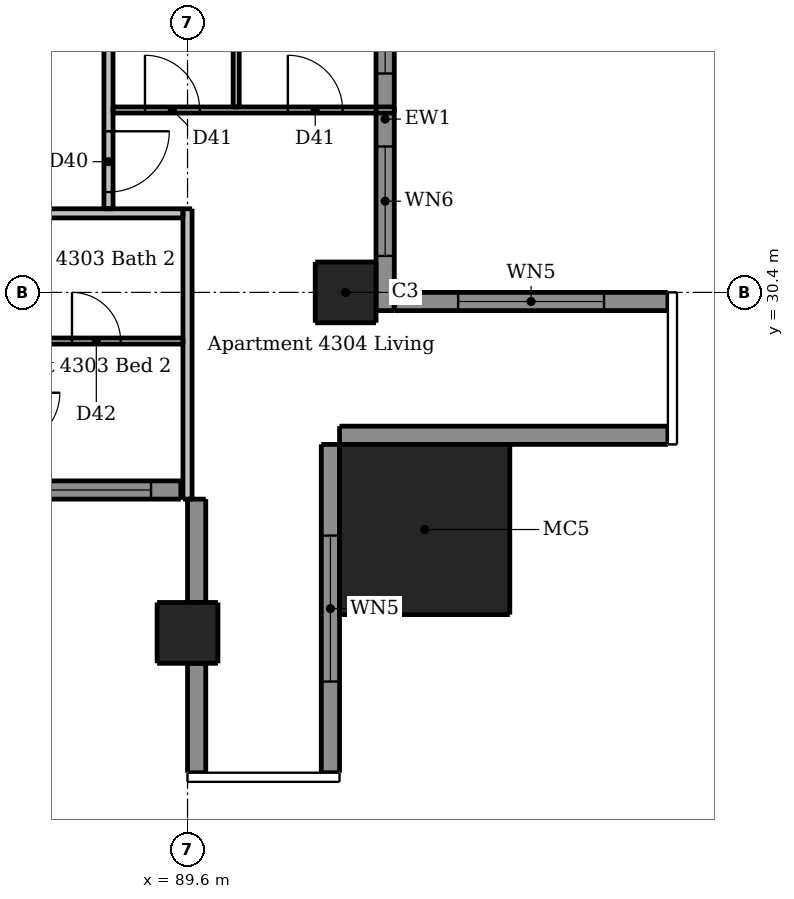
"""IFC4 building model, lengths in metres.
Left out: names, types, materials, properties, quantities, classifications, styles, units other than length and angle.
Written with IfcOpenShell. Run it as: python <this file> out.ifc"""

import sys

from ifc_helpers import new_model, si_unit, direction, frame, frame_2d, origin, origin_2d, place, context, subcontext, project, spatial, rectangle, extrude, element, fill, save


model = new_model("IFC4")
c1 = context("Model", 3, precision=1e-05, world=origin(), true_north=direction((0.0, 1.0)))
c2 = subcontext(c1, "Body", "Model", "MODEL_VIEW")
j1 = project(units=[si_unit("LENGTHUNIT", "METRE"), si_unit("PLANEANGLEUNIT", "RADIAN")], contexts=[c1])
p1 = place(None, origin())
s1 = spatial("IfcSite", under=j1, at=p1, CompositionType="ELEMENT")
p2 = place(p1, origin())
s2 = spatial("IfcBuilding", under=s1, at=p2, CompositionType="ELEMENT")
p3 = place(p2, frame((0.0, 0.0, 161.5)))
s3 = spatial("IfcBuildingStorey", under=s2, at=p3, CompositionType="ELEMENT", Elevation=161.5)
for number, where, z_axis, x_axis in (
    (1, (89.6, 24.8, 0.0), (0.0, 0.0, 1.0), (1.0, 0.0, 0.0)),
    (2, (92.2, 30.4, 0.0), (0.0, 0.0, 1.0), (1.0, 0.0, 0.0)),
):
    element("IfcColumn", number, at=place(p3, frame(where, z_axis=z_axis, x_axis=x_axis)), inside=s3, PredefinedType="COLUMN", context=c2, shape_type="SweptSolid", body=[
        extrude(rectangle(XDim=1.0, YDim=1.0, at=origin_2d()), origin(), (0.0, 0.0, 1.0), 3.05),
    ])
p4 = place(p3, frame((93.5, 26.5, 0.0), z_axis=(0.0, 0.0, 1.0), x_axis=(1.0, 0.0, 0.0)))
e3 = element("IfcColumn", 3, at=p4, inside=s3, PredefinedType="COLUMN", context=c2, shape_type="SweptSolid", body=[
    extrude(rectangle(XDim=2.8, YDim=2.8, at=origin_2d()), origin(), (0.0, 0.0, 1.0), 3.3),
])
p5 = place(p3, frame((89.75, 27.0, 0.0), z_axis=(0.0, 0.0, 1.0), x_axis=(0.0, -1.0, 0.0)))
e4 = element("IfcWall", 4, at=p5, inside=s3, PredefinedType="SOLIDWALL", context=c2, shape_type="SweptSolid", body=[
    extrude(rectangle(XDim=1.7, YDim=0.3, at=frame_2d((0.85, 0.0))), origin(), (0.0, 0.0, 1.0), 3.05),
])
p6 = place(p3, frame((89.75, 24.3, 0.0), z_axis=(0.0, 0.0, 1.0), x_axis=(0.0, -1.0, 0.0)))
e5 = element("IfcWall", 5, at=p6, inside=s3, PredefinedType="SOLIDWALL", context=c2, shape_type="SweptSolid", body=[
    extrude(rectangle(XDim=1.8, YDim=0.3, at=frame_2d((0.9, 0.0))), origin(), (0.0, 0.0, 1.0), 3.05),
])
p7 = place(p3, frame((91.95, 22.5, 0.0), z_axis=(0.0, 0.0, 1.0), x_axis=(0.0, 1.0, 0.0)))
e6 = element("IfcWall", 6, at=p7, inside=s3, PredefinedType="SOLIDWALL", context=c2, shape_type="SweptSolid", body=[
    extrude(rectangle(XDim=5.4, YDim=0.3, at=frame_2d((2.7, 0.0))), origin(), (0.0, 0.0, 1.0), 3.05),
])
p8 = place(p7, frame((1.5, 0.0, 0.15)))
e7 = element("IfcOpeningElement", 7, at=p8, cuts=e6, PredefinedType="OPENING", context=c2, shape_type="SweptSolid", body=[
    extrude(rectangle(XDim=2.4, YDim=2.1, at=frame_2d((1.2, 1.05))), frame((0.0, 0.16, 0.0), z_axis=(0.0, -1.0, 0.0), x_axis=(1.0, 0.0, 0.0)), (0.0, 0.0, 1.0), 0.32),
])
p9 = place(p3, frame((92.1, 28.05, 0.0), z_axis=(0.0, 0.0, 1.0), x_axis=(1.0, 0.0, 0.0)))
e8 = element("IfcWall", 8, at=p9, inside=s3, PredefinedType="SOLIDWALL", context=c2, shape_type="SweptSolid", body=[
    extrude(rectangle(XDim=5.4, YDim=0.3, at=frame_2d((2.7, 0.0))), origin(), (0.0, 0.0, 1.0), 3.05),
])
p10 = place(p3, frame((97.5, 30.25, 0.0), z_axis=(0.0, 0.0, 1.0), x_axis=(-1.0, 0.0, 0.0)))
e9 = element("IfcWall", 9, at=p10, inside=s3, PredefinedType="SOLIDWALL", context=c2, shape_type="SweptSolid", body=[
    extrude(rectangle(XDim=4.5, YDim=0.3, at=frame_2d((2.25, 0.0))), origin(), (0.0, 0.0, 1.0), 3.05),
])
p11 = place(p10, frame((1.05, 0.0, 0.15)))
e10 = element("IfcOpeningElement", 10, at=p11, cuts=e9, PredefinedType="OPENING", context=c2, shape_type="SweptSolid", body=[
    extrude(rectangle(XDim=2.4, YDim=2.1, at=frame_2d((1.2, 1.05))), frame((0.0, 0.16, 0.0), z_axis=(0.0, -1.0, 0.0), x_axis=(1.0, 0.0, 0.0)), (0.0, 0.0, 1.0), 0.32),
])
p12 = place(p3, frame((83.7, 27.15, 0.0), z_axis=(0.0, 0.0, 1.0), x_axis=(1.0, 0.0, 0.0)))
e11 = element("IfcWall", 11, at=p12, inside=s3, PredefinedType="SOLIDWALL", context=c2, shape_type="SweptSolid", body=[
    extrude(rectangle(XDim=5.79, YDim=0.3, at=frame_2d((2.895, 0.0))), origin(), (0.0, 0.0, 1.0), 3.05),
])
p13 = place(p12, frame((0.5, 0.0, 0.15)))
e12 = element("IfcOpeningElement", 12, at=p13, cuts=e11, PredefinedType="OPENING", context=c2, shape_type="SweptSolid", body=[
    extrude(rectangle(XDim=1.8, YDim=2.1, at=frame_2d((0.9, 1.05))), frame((0.0, 0.16, 0.0), z_axis=(0.0, -1.0, 0.0), x_axis=(1.0, 0.0, 0.0)), (0.0, 0.0, 1.0), 0.32),
])
p14 = place(p12, frame((3.5, 0.0, 0.15)))
e13 = element("IfcOpeningElement", 13, at=p14, cuts=e11, PredefinedType="OPENING", context=c2, shape_type="SweptSolid", body=[
    extrude(rectangle(XDim=1.8, YDim=2.1, at=frame_2d((0.9, 1.05))), frame((0.0, 0.16, 0.0), z_axis=(0.0, -1.0, 0.0), x_axis=(1.0, 0.0, 0.0)), (0.0, 0.0, 1.0), 0.32),
])
p15 = place(p3, frame((92.85, 30.1, 0.0), z_axis=(0.0, 0.0, 1.0), x_axis=(0.0, 1.0, 0.0)))
e14 = element("IfcWall", 14, at=p15, inside=s3, PredefinedType="SOLIDWALL", context=c2, shape_type="SweptSolid", body=[
    extrude(rectangle(XDim=6.3, YDim=0.3, at=frame_2d((3.15, 0.0))), origin(), (0.0, 0.0, 1.0), 3.05),
])
p16 = place(p15, frame((0.9, 0.0, 0.15)))
e15 = element("IfcOpeningElement", 15, at=p16, cuts=e14, PredefinedType="OPENING", context=c2, shape_type="SweptSolid", body=[
    extrude(rectangle(XDim=1.8, YDim=2.1, at=frame_2d((0.9, 1.05))), frame((0.0, 0.16, 0.0), z_axis=(0.0, -1.0, 0.0), x_axis=(1.0, 0.0, 0.0)), (0.0, 0.0, 1.0), 0.32),
])
p17 = place(p15, frame((3.9, 0.0, 0.15)))
e16 = element("IfcOpeningElement", 16, at=p17, cuts=e14, PredefinedType="OPENING", context=c2, shape_type="SweptSolid", body=[
    extrude(rectangle(XDim=1.8, YDim=2.1, at=frame_2d((0.9, 1.05))), frame((0.0, 0.16, 0.0), z_axis=(0.0, -1.0, 0.0), x_axis=(1.0, 0.0, 0.0)), (0.0, 0.0, 1.0), 0.32),
])
p18 = place(p3, frame((90.4, 33.45, 0.0), z_axis=(0.0, 0.0, 1.0), x_axis=(0.0, 1.0, 0.0)))
e17 = element("IfcWall", 17, at=p18, inside=s3, PredefinedType="PARTITIONING", context=c2, shape_type="SweptSolid", body=[
    extrude(rectangle(XDim=8.1, YDim=0.1, at=frame_2d((4.05, 0.0))), origin(), (0.0, 0.0, 1.0), 3.05),
])
p19 = place(p18, frame((3.75, 0.0, 0.0)))
e18 = element("IfcOpeningElement", 18, at=p19, cuts=e17, PredefinedType="OPENING", context=c2, shape_type="SweptSolid", body=[
    extrude(rectangle(XDim=0.8, YDim=2.1, at=frame_2d((0.4, 1.05))), frame((0.0, 0.06, 0.0), z_axis=(0.0, -1.0, 0.0), x_axis=(1.0, 0.0, 0.0)), (0.0, 0.0, 1.0), 0.12),
])
p20 = place(p18, frame((6.55, 0.0, 0.0)))
e19 = element("IfcOpeningElement", 19, at=p20, cuts=e17, PredefinedType="OPENING", context=c2, shape_type="SweptSolid", body=[
    extrude(rectangle(XDim=0.9, YDim=2.1, at=frame_2d((0.45, 1.05))), frame((0.0, 0.06, 0.0), z_axis=(0.0, -1.0, 0.0), x_axis=(1.0, 0.0, 0.0)), (0.0, 0.0, 1.0), 0.12),
])
p21 = place(p3, frame((88.375, 33.4, 0.0), z_axis=(0.0, 0.0, 1.0), x_axis=(1.0, 0.0, 0.0)))
e20 = element("IfcWall", 20, at=p21, inside=s3, PredefinedType="PARTITIONING", context=c2, shape_type="SweptSolid", body=[
    extrude(rectangle(XDim=4.625, YDim=0.1, at=frame_2d((2.312, 0.0))), origin(), (0.0, 0.0, 1.0), 3.05),
])
p22 = place(p21, frame((0.525, 0.0, 0.0)))
e21 = element("IfcOpeningElement", 21, at=p22, cuts=e20, PredefinedType="OPENING", context=c2, shape_type="SweptSolid", body=[
    extrude(rectangle(XDim=0.9, YDim=2.1, at=frame_2d((0.45, 1.05))), frame((0.0, 0.06, 0.0), z_axis=(0.0, -1.0, 0.0), x_axis=(1.0, 0.0, 0.0)), (0.0, 0.0, 1.0), 0.12),
])
p23 = place(p21, frame((2.875, 0.0, 0.0)))
e22 = element("IfcOpeningElement", 22, at=p23, cuts=e20, PredefinedType="OPENING", context=c2, shape_type="SweptSolid", body=[
    extrude(rectangle(XDim=0.9, YDim=2.1, at=frame_2d((0.45, 1.05))), frame((0.0, 0.06, 0.0), z_axis=(0.0, -1.0, 0.0), x_axis=(1.0, 0.0, 0.0)), (0.0, 0.0, 1.0), 0.12),
])
p24 = place(p3, frame((84.25, 29.6, 0.0), z_axis=(0.0, 0.0, 1.0), x_axis=(1.0, 0.0, 0.0)))
e23 = element("IfcWall", 23, at=p24, inside=s3, PredefinedType="PARTITIONING", context=c2, shape_type="SweptSolid", body=[
    extrude(rectangle(XDim=5.275, YDim=0.1, at=frame_2d((2.637, 0.0))), origin(), (0.0, 0.0, 1.0), 3.05),
])
p25 = place(p24, frame((0.7, 0.0, 0.0)))
e24 = element("IfcOpeningElement", 24, at=p25, cuts=e23, PredefinedType="OPENING", context=c2, shape_type="SweptSolid", body=[
    extrude(rectangle(XDim=0.9, YDim=2.1, at=frame_2d((0.45, 1.05))), frame((0.0, 0.06, 0.0), z_axis=(0.0, -1.0, 0.0), x_axis=(1.0, 0.0, 0.0)), (0.0, 0.0, 1.0), 0.12),
])
p26 = place(p24, frame((3.45, 0.0, 0.0)))
e25 = element("IfcOpeningElement", 25, at=p26, cuts=e23, PredefinedType="OPENING", context=c2, shape_type="SweptSolid", body=[
    extrude(rectangle(XDim=0.8, YDim=2.1, at=frame_2d((0.4, 1.05))), frame((0.0, 0.06, 0.0), z_axis=(0.0, -1.0, 0.0), x_axis=(1.0, 0.0, 0.0)), (0.0, 0.0, 1.0), 0.12),
])
p27 = place(p3, frame((88.3, 61.175, 0.0), z_axis=(0.0, 0.0, 1.0), x_axis=(0.0, -1.0, 0.0)))
e26 = element("IfcWall", 26, at=p27, inside=s3, PredefinedType="PARTITIONING", context=c2, shape_type="SweptSolid", body=[
    extrude(rectangle(XDim=29.4, YDim=0.15, at=frame_2d((14.7, 0.0))), origin(), (0.0, 0.0, 1.0), 3.05),
])
p28 = place(p27, frame((28.125, 0.0, 0.0)))
e27 = element("IfcOpeningElement", 27, at=p28, cuts=e26, PredefinedType="OPENING", context=c2, shape_type="SweptSolid", body=[
    extrude(rectangle(XDim=1.0, YDim=2.1, at=frame_2d((0.5, 1.05))), frame((0.0, 0.085, 0.0), z_axis=(0.0, -1.0, 0.0), x_axis=(1.0, 0.0, 0.0)), (0.0, 0.0, 1.0), 0.17),
])
p29 = place(p27, frame((18.275, 0.0, 0.0)))
e28 = element("IfcOpeningElement", 28, at=p29, cuts=e26, PredefinedType="OPENING", context=c2, shape_type="SweptSolid", body=[
    extrude(rectangle(XDim=1.0, YDim=2.1, at=frame_2d((0.5, 1.05))), frame((0.0, 0.085, 0.0), z_axis=(0.0, -1.0, 0.0), x_axis=(1.0, 0.0, 0.0)), (0.0, 0.0, 1.0), 0.17),
])
p30 = place(p27, frame((10.475, 0.0, 0.0)))
e29 = element("IfcOpeningElement", 29, at=p30, cuts=e26, PredefinedType="OPENING", context=c2, shape_type="SweptSolid", body=[
    extrude(rectangle(XDim=1.0, YDim=2.1, at=frame_2d((0.5, 1.05))), frame((0.0, 0.085, 0.0), z_axis=(0.0, -1.0, 0.0), x_axis=(1.0, 0.0, 0.0)), (0.0, 0.0, 1.0), 0.17),
])
p31 = place(p27, frame((3.275, 0.0, 0.0)))
e30 = element("IfcOpeningElement", 30, at=p31, cuts=e26, PredefinedType="OPENING", context=c2, shape_type="SweptSolid", body=[
    extrude(rectangle(XDim=1.0, YDim=2.1, at=frame_2d((0.5, 1.05))), frame((0.0, 0.085, 0.0), z_axis=(0.0, -1.0, 0.0), x_axis=(1.0, 0.0, 0.0)), (0.0, 0.0, 1.0), 0.17),
])
p32 = place(p3, frame((89.6, 27.0, 0.0), z_axis=(0.0, 0.0, 1.0), x_axis=(0.0, 1.0, 0.0)))
e31 = element("IfcWall", 31, at=p32, inside=s3, PredefinedType="PARTITIONING", context=c2, shape_type="SweptSolid", body=[
    extrude(rectangle(XDim=4.775, YDim=0.15, at=frame_2d((2.387, 0.0))), origin(), (0.0, 0.0, 1.0), 2.51),
])
p33 = place(p3, frame((89.525, 31.7, 0.0), z_axis=(0.0, 0.0, 1.0), x_axis=(-1.0, 0.0, 0.0)))
e32 = element("IfcWall", 32, at=p33, inside=s3, PredefinedType="PARTITIONING", context=c2, shape_type="SweptSolid", body=[
    extrude(rectangle(XDim=30.55, YDim=0.15, at=frame_2d((15.275, 0.0))), origin(), (0.0, 0.0, 1.0), 3.05),
])
p34 = place(p33, frame((26.775, 0.0, 0.0)))
e33 = element("IfcOpeningElement", 33, at=p34, cuts=e32, PredefinedType="OPENING", context=c2, shape_type="SweptSolid", body=[
    extrude(rectangle(XDim=1.0, YDim=2.1, at=frame_2d((0.5, 1.05))), frame((0.0, 0.085, 0.0), z_axis=(0.0, -1.0, 0.0), x_axis=(1.0, 0.0, 0.0)), (0.0, 0.0, 1.0), 0.17),
])
p35 = place(p33, frame((14.425, 0.0, 0.0)))
e34 = element("IfcOpeningElement", 34, at=p35, cuts=e32, PredefinedType="OPENING", context=c2, shape_type="SweptSolid", body=[
    extrude(rectangle(XDim=1.0, YDim=2.1, at=frame_2d((0.5, 1.05))), frame((0.0, 0.085, 0.0), z_axis=(0.0, -1.0, 0.0), x_axis=(1.0, 0.0, 0.0)), (0.0, 0.0, 1.0), 0.17),
])
p36 = place(p33, frame((6.575, 0.0, 0.0)))
e35 = element("IfcOpeningElement", 35, at=p36, cuts=e32, PredefinedType="OPENING", context=c2, shape_type="SweptSolid", body=[
    extrude(rectangle(XDim=1.0, YDim=2.1, at=frame_2d((0.5, 1.05))), frame((0.0, 0.085, 0.0), z_axis=(0.0, -1.0, 0.0), x_axis=(1.0, 0.0, 0.0)), (0.0, 0.0, 1.0), 0.17),
])
p37 = place(p8, origin())
e36 = element("IfcWindow", 36, at=p37, inside=s3, PartitioningType="DOUBLE_PANEL_VERTICAL", PredefinedType="WINDOW", context=c2, shape_type="SweptSolid", body=[
    extrude(rectangle(XDim=2.4, YDim=2.1, at=frame_2d((1.2, 1.05))), frame((0.0, 0.03, 0.0), z_axis=(0.0, -1.0, 0.0), x_axis=(1.0, 0.0, 0.0)), (0.0, 0.0, 1.0), 0.06),
])
fill(e7, e36)
p38 = place(p11, origin())
e37 = element("IfcWindow", 37, at=p38, inside=s3, PartitioningType="DOUBLE_PANEL_VERTICAL", PredefinedType="WINDOW", context=c2, shape_type="SweptSolid", body=[
    extrude(rectangle(XDim=2.4, YDim=2.1, at=frame_2d((1.2, 1.05))), frame((0.0, 0.03, 0.0), z_axis=(0.0, -1.0, 0.0), x_axis=(1.0, 0.0, 0.0)), (0.0, 0.0, 1.0), 0.06),
])
fill(e10, e37)
p39 = place(p14, origin())
e38 = element("IfcWindow", 38, at=p39, inside=s3, PartitioningType="DOUBLE_PANEL_VERTICAL", PredefinedType="WINDOW", context=c2, shape_type="SweptSolid", body=[
    extrude(rectangle(XDim=1.8, YDim=2.1, at=frame_2d((0.9, 1.05))), frame((0.0, 0.03, 0.0), z_axis=(0.0, -1.0, 0.0), x_axis=(1.0, 0.0, 0.0)), (0.0, 0.0, 1.0), 0.06),
])
fill(e13, e38)
p40 = place(p16, origin())
e39 = element("IfcWindow", 39, at=p40, inside=s3, PartitioningType="DOUBLE_PANEL_VERTICAL", PredefinedType="WINDOW", context=c2, shape_type="SweptSolid", body=[
    extrude(rectangle(XDim=1.8, YDim=2.1, at=frame_2d((0.9, 1.05))), frame((0.0, 0.03, 0.0), z_axis=(0.0, -1.0, 0.0), x_axis=(1.0, 0.0, 0.0)), (0.0, 0.0, 1.0), 0.06),
])
fill(e15, e39)
p41 = place(p17, origin())
e40 = element("IfcWindow", 40, at=p41, inside=s3, PartitioningType="DOUBLE_PANEL_VERTICAL", PredefinedType="WINDOW", context=c2, shape_type="SweptSolid", body=[
    extrude(rectangle(XDim=1.8, YDim=2.1, at=frame_2d((0.9, 1.05))), frame((0.0, 0.03, 0.0), z_axis=(0.0, -1.0, 0.0), x_axis=(1.0, 0.0, 0.0)), (0.0, 0.0, 1.0), 0.06),
])
fill(e16, e40)
p42 = place(p26, origin())
e41 = element("IfcDoor", 41, at=p42, inside=s3, OperationType="SINGLE_SWING_LEFT", PredefinedType="DOOR", context=c2, shape_type="SweptSolid", body=[
    extrude(rectangle(XDim=0.8, YDim=2.1, at=frame_2d((0.4, 1.05))), frame((0.0, 0.025, 0.0), z_axis=(0.0, -1.0, 0.0), x_axis=(1.0, 0.0, 0.0)), (0.0, 0.0, 1.0), 0.05),
])
fill(e25, e41)
p43 = place(p28, origin())
e42 = element("IfcDoor", 42, at=p43, inside=s3, OperationType="SINGLE_SWING_LEFT", PredefinedType="DOOR", context=c2, shape_type="SweptSolid", body=[
    extrude(rectangle(XDim=1.0, YDim=2.1, at=frame_2d((0.5, 1.05))), frame((0.0, 0.025, 0.0), z_axis=(0.0, -1.0, 0.0), x_axis=(1.0, 0.0, 0.0)), (0.0, 0.0, 1.0), 0.05),
])
fill(e27, e42)
p44 = place(p22, origin())
e43 = element("IfcDoor", 43, at=p44, inside=s3, OperationType="SINGLE_SWING_LEFT", PredefinedType="DOOR", context=c2, shape_type="SweptSolid", body=[
    extrude(rectangle(XDim=0.9, YDim=2.1, at=frame_2d((0.45, 1.05))), frame((0.0, 0.025, 0.0), z_axis=(0.0, -1.0, 0.0), x_axis=(1.0, 0.0, 0.0)), (0.0, 0.0, 1.0), 0.05),
])
fill(e21, e43)
p45 = place(p23, origin())
e44 = element("IfcDoor", 44, at=p45, inside=s3, OperationType="SINGLE_SWING_LEFT", PredefinedType="DOOR", context=c2, shape_type="SweptSolid", body=[
    extrude(rectangle(XDim=0.9, YDim=2.1, at=frame_2d((0.45, 1.05))), frame((0.0, 0.025, 0.0), z_axis=(0.0, -1.0, 0.0), x_axis=(1.0, 0.0, 0.0)), (0.0, 0.0, 1.0), 0.05),
])
fill(e22, e44)
save(model, sys.argv[1])
